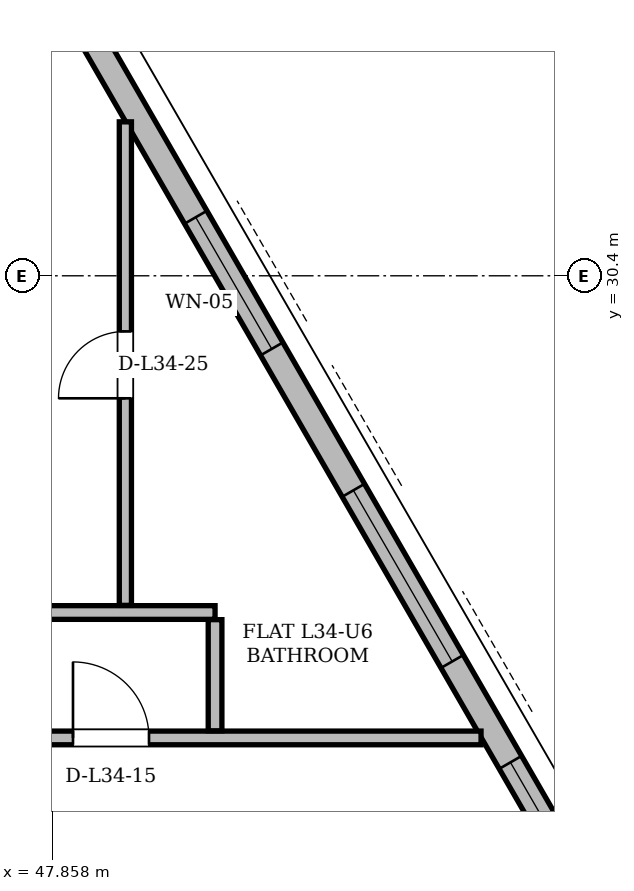
"""IFC4 building model, lengths in metres.
Left out: names, types, materials, properties, quantities, classifications, styles, units other than length and angle.
Written with IfcOpenShell. Run it as: python <this file> out.ifc"""

import sys

from ifc_helpers import new_model, si_unit, direction, frame, frame_2d, origin, place, context, subcontext, project, spatial, rectangle, extrude, element, fill, save


model = new_model("IFC4")
c1 = context("Model", 3, precision=1e-05, world=origin(), true_north=direction((0.0, 1.0)))
c2 = subcontext(c1, "Body", "Model", "MODEL_VIEW")
j1 = project(units=[si_unit("LENGTHUNIT", "METRE"), si_unit("PLANEANGLEUNIT", "RADIAN")], contexts=[c1])
p1 = place(None, origin())
s1 = spatial("IfcSite", under=j1, at=p1, CompositionType="ELEMENT")
p2 = place(p1, origin())
s2 = spatial("IfcBuilding", under=s1, at=p2, CompositionType="ELEMENT")
p3 = place(p2, frame((0.0, 0.0, 130.2)))
s3 = spatial("IfcBuildingStorey", under=s2, at=p3, CompositionType="ELEMENT", Elevation=130.2)
p4 = place(p3, frame((60.258, 12.962, 0.0), z_axis=(0.0, 0.0, 1.0), x_axis=(-0.499999044439, 0.866025955477, 0.0)))
e1 = element("IfcWall", 1, at=p4, inside=s3, PredefinedType="SOLIDWALL", context=c2, shape_type="SweptSolid", body=[
    extrude(rectangle(XDim=35.122, YDim=0.34, at=frame_2d((17.561, 0.0))), origin(), (0.0, 0.0, 1.0), 2.558),
])
p5 = place(p4, frame((8.034, 0.0, 0.0)))
e2 = element("IfcOpeningElement", 2, at=p5, cuts=e1, PredefinedType="OPENING", context=c2, shape_type="SweptSolid", body=[
    extrude(rectangle(XDim=1.5, YDim=2.2, at=frame_2d((0.75, 1.1))), frame((0.0, 0.17, 0.0), z_axis=(0.0, -1.0, 0.0), x_axis=(1.0, 0.0, 0.0)), (0.0, 0.0, 1.0), 0.34),
])
p6 = place(p4, frame((27.042, 0.0, 0.0)))
e3 = element("IfcOpeningElement", 3, at=p6, cuts=e1, PredefinedType="OPENING", context=c2, shape_type="SweptSolid", body=[
    extrude(rectangle(XDim=1.5, YDim=2.2, at=frame_2d((0.75, 1.1))), frame((0.0, 0.17, 0.0), z_axis=(0.0, -1.0, 0.0), x_axis=(1.0, 0.0, 0.0)), (0.0, 0.0, 1.0), 0.34),
])
p7 = place(p4, frame((3.327, 0.0, 0.85)))
e4 = element("IfcOpeningElement", 4, at=p7, cuts=e1, PredefinedType="OPENING", context=c2, shape_type="SweptSolid", body=[
    extrude(rectangle(XDim=1.2, YDim=1.48, at=frame_2d((0.6, 0.74))), frame((0.0, 0.17, 0.0), z_axis=(0.0, -1.0, 0.0), x_axis=(1.0, 0.0, 0.0)), (0.0, 0.0, 1.0), 0.34),
])
p8 = place(p4, frame((11.544, 0.0, 0.85)))
e5 = element("IfcOpeningElement", 5, at=p8, cuts=e1, PredefinedType="OPENING", context=c2, shape_type="SweptSolid", body=[
    extrude(rectangle(XDim=1.2, YDim=1.48, at=frame_2d((0.6, 0.74))), frame((0.0, 0.17, 0.0), z_axis=(0.0, -1.0, 0.0), x_axis=(1.0, 0.0, 0.0)), (0.0, 0.0, 1.0), 0.34),
])
p9 = place(p4, frame((31.202, 0.0, 0.85)))
e6 = element("IfcOpeningElement", 6, at=p9, cuts=e1, PredefinedType="OPENING", context=c2, shape_type="SweptSolid", body=[
    extrude(rectangle(XDim=2.2, YDim=1.598, at=frame_2d((1.1, 0.799))), frame((0.0, 0.17, 0.0), z_axis=(0.0, -1.0, 0.0), x_axis=(1.0, 0.0, 0.0)), (0.0, 0.0, 1.0), 0.34),
])
p10 = place(p4, frame((14.277, 0.0, 0.85)))
e7 = element("IfcOpeningElement", 7, at=p10, cuts=e1, PredefinedType="OPENING", context=c2, shape_type="SweptSolid", body=[
    extrude(rectangle(XDim=2.6, YDim=1.598, at=frame_2d((1.3, 0.799))), frame((0.0, 0.17, 0.0), z_axis=(0.0, -1.0, 0.0), x_axis=(1.0, 0.0, 0.0)), (0.0, 0.0, 1.0), 0.34),
])
p11 = place(p4, frame((19.025, 0.0, 0.85)))
e8 = element("IfcOpeningElement", 8, at=p11, cuts=e1, PredefinedType="OPENING", context=c2, shape_type="SweptSolid", body=[
    extrude(rectangle(XDim=2.0, YDim=1.598, at=frame_2d((1.0, 0.799))), frame((0.0, 0.17, 0.0), z_axis=(0.0, -1.0, 0.0), x_axis=(1.0, 0.0, 0.0)), (0.0, 0.0, 1.0), 0.34),
])
p12 = place(p3, frame((46.09, 24.32, 0.0), z_axis=(0.0, 0.0, 1.0), x_axis=(1.0, 0.0, 0.0)))
e9 = element("IfcWall", 9, at=p12, inside=s3, PredefinedType="PARTITIONING", context=c2, shape_type="SweptSolid", body=[
    extrude(rectangle(XDim=7.409, YDim=0.18, at=frame_2d((3.705, 0.0))), origin(), (0.0, 0.0, 1.0), 3.34),
])
p13 = place(p12, frame((2.041, 0.0, 0.0)))
e10 = element("IfcOpeningElement", 10, at=p13, cuts=e9, PredefinedType="OPENING", context=c2, shape_type="SweptSolid", body=[
    extrude(rectangle(XDim=1.0, YDim=2.18, at=frame_2d((0.5, 1.09))), frame((0.0, 0.09, 0.0), z_axis=(0.0, -1.0, 0.0), x_axis=(1.0, 0.0, 0.0)), (0.0, 0.0, 1.0), 0.18),
])
p14 = place(p3, frame((38.3, 25.97, 0.0), z_axis=(0.0, 0.0, 1.0), x_axis=(1.0, 0.0, 0.0)))
e11 = element("IfcWall", 11, at=p14, inside=s3, PredefinedType="PARTITIONING", context=c2, shape_type="SweptSolid", body=[
    extrude(rectangle(XDim=11.7, YDim=0.18, at=frame_2d((5.85, 0.0))), origin(), (0.0, 0.0, 1.0), 2.794),
])
p15 = place(p3, frame((48.82, 26.064, 0.0), z_axis=(0.0, 0.0, 1.0), x_axis=(0.0, 1.0, 0.0)))
e12 = element("IfcWall", 12, at=p15, inside=s3, PredefinedType="PARTITIONING", context=c2, shape_type="SweptSolid", body=[
    extrude(rectangle(XDim=6.361, YDim=0.16, at=frame_2d((3.181, 0.0))), origin(), (0.0, 0.0, 1.0), 2.558),
])
p16 = place(p15, frame((2.724, 0.0, 0.0)))
e13 = element("IfcOpeningElement", 13, at=p16, cuts=e12, PredefinedType="OPENING", context=c2, shape_type="SweptSolid", body=[
    extrude(rectangle(XDim=0.88, YDim=2.08, at=frame_2d((0.44, 1.04))), frame((0.0, 0.08, 0.0), z_axis=(0.0, -1.0, 0.0), x_axis=(1.0, 0.0, 0.0)), (0.0, 0.0, 1.0), 0.16),
])
p17 = place(p3, frame((50.0, 24.414, 0.0), z_axis=(0.0, 0.0, 1.0), x_axis=(0.0, 1.0, 0.0)))
e14 = element("IfcWall", 14, at=p17, inside=s3, PredefinedType="PARTITIONING", context=c2, shape_type="SweptSolid", body=[
    extrude(rectangle(XDim=1.462, YDim=0.18, at=frame_2d((0.731, 0.0))), origin(), (0.0, 0.0, 1.0), 3.34),
])
p18 = place(p8, origin())
e15 = element("IfcWindow", 15, at=p18, inside=s3, PartitioningType="SINGLE_PANEL", PredefinedType="WINDOW", context=c2, shape_type="SweptSolid", body=[
    extrude(rectangle(XDim=1.2, YDim=1.48, at=frame_2d((0.6, 0.74))), frame((0.0, 0.03, 0.0), z_axis=(0.0, -1.0, 0.0), x_axis=(1.0, 0.0, 0.0)), (0.0, 0.0, 1.0), 0.06),
])
fill(e5, e15)
p19 = place(p10, origin())
e16 = element("IfcWindow", 16, at=p19, inside=s3, PartitioningType="SINGLE_PANEL", PredefinedType="WINDOW", context=c2, shape_type="SweptSolid", body=[
    extrude(rectangle(XDim=2.6, YDim=1.598, at=frame_2d((1.3, 0.799))), frame((0.0, 0.03, 0.0), z_axis=(0.0, -1.0, 0.0), x_axis=(1.0, 0.0, 0.0)), (0.0, 0.0, 1.0), 0.06),
])
fill(e7, e16)
p20 = place(p11, origin())
e17 = element("IfcWindow", 17, at=p20, inside=s3, PartitioningType="SINGLE_PANEL", PredefinedType="WINDOW", context=c2, shape_type="SweptSolid", body=[
    extrude(rectangle(XDim=2.0, YDim=1.598, at=frame_2d((1.0, 0.799))), frame((0.0, 0.03, 0.0), z_axis=(0.0, -1.0, 0.0), x_axis=(1.0, 0.0, 0.0)), (0.0, 0.0, 1.0), 0.06),
])
fill(e8, e17)
p21 = place(p13, origin())
e18 = element("IfcDoor", 18, at=p21, inside=s3, OperationType="SINGLE_SWING_LEFT", PredefinedType="DOOR", context=c2, shape_type="SweptSolid", body=[
    extrude(rectangle(XDim=1.0, YDim=2.18, at=frame_2d((0.5, 1.09))), frame((0.0, 0.025, 0.0), z_axis=(0.0, -1.0, 0.0), x_axis=(1.0, 0.0, 0.0)), (0.0, 0.0, 1.0), 0.05),
])
fill(e10, e18)
p22 = place(p16, origin())
e19 = element("IfcDoor", 19, at=p22, inside=s3, OperationType="SINGLE_SWING_LEFT", PredefinedType="DOOR", context=c2, shape_type="SweptSolid", body=[
    extrude(rectangle(XDim=0.88, YDim=2.08, at=frame_2d((0.44, 1.04))), frame((0.0, 0.025, 0.0), z_axis=(0.0, -1.0, 0.0), x_axis=(1.0, 0.0, 0.0)), (0.0, 0.0, 1.0), 0.05),
])
fill(e13, e19)
save(model, sys.argv[1])
